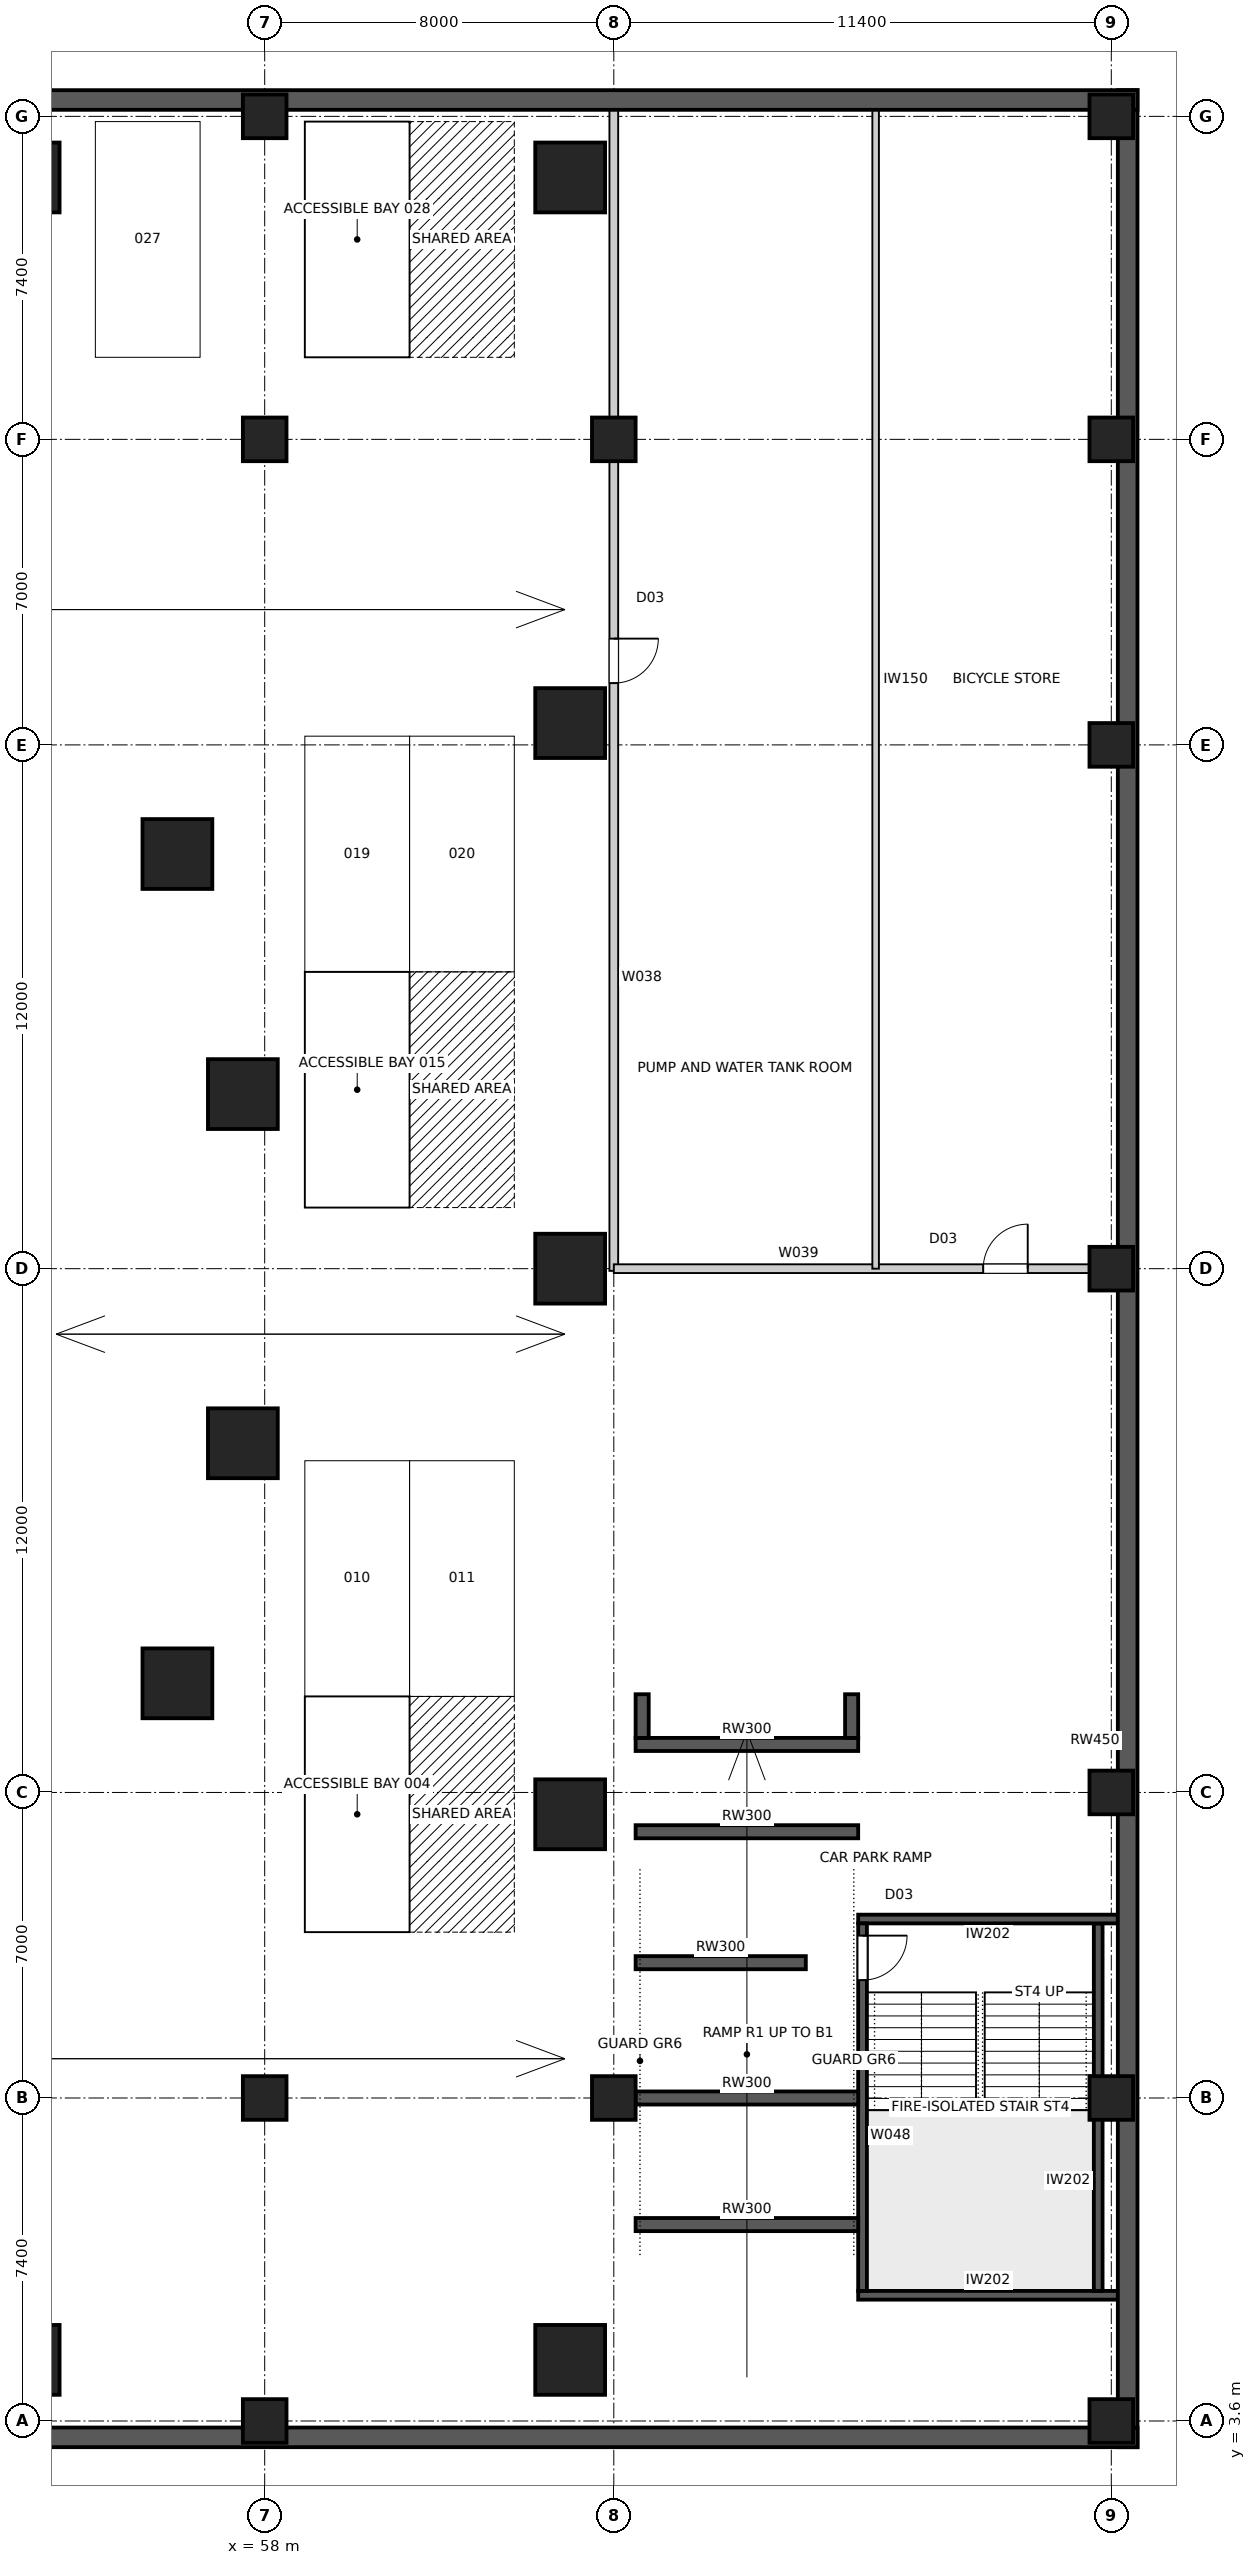
"""IFC4 building model, lengths in metres.
Left out: names, types, materials, properties, quantities, classifications, styles, units other than length and angle.
Written with IfcOpenShell. Run it as: python <this file> out.ifc"""

import sys

from ifc_helpers import new_model, si_unit, direction, frame, frame_2d, origin, origin_2d, place, context, subcontext, project, spatial, rectangle, extrude, element, fill, save


model = new_model("IFC4")
c1 = context("Model", 3, precision=1e-05, world=origin(), true_north=direction((0.0, 1.0)))
c2 = subcontext(c1, "Body", "Model", "MODEL_VIEW")
j1 = project(units=[si_unit("LENGTHUNIT", "METRE"), si_unit("PLANEANGLEUNIT", "RADIAN")], contexts=[c1])
p1 = place(None, origin())
s1 = spatial("IfcSite", under=j1, at=p1, CompositionType="ELEMENT")
p2 = place(p1, origin())
s2 = spatial("IfcBuilding", under=s1, at=p2, CompositionType="ELEMENT")
p3 = place(p2, frame((0.0, 0.0, -7.4)))
s3 = spatial("IfcBuildingStorey", under=s2, at=p3, CompositionType="ELEMENT", Elevation=-7.4)
for number, where, z_axis, x_axis in (
    (1, (52.5, 5.0, -0.4), (0.0, 0.0, 1.0), (1.0, 0.0, 0.0)),
    (2, (65.0, 5.0, -0.4), (0.0, 0.0, 1.0), (1.0, 0.0, 0.0)),
    (3, (65.0, 17.5, -0.4), (0.0, 0.0, 1.0), (1.0, 0.0, 0.0)),
    (4, (65.0, 30.0, -0.4), (0.0, 0.0, 1.0), (1.0, 0.0, 0.0)),
    (5, (65.0, 42.5, -0.4), (0.0, 0.0, 1.0), (1.0, 0.0, 0.0)),
    (6, (65.0, 55.0, -0.4), (0.0, 0.0, 1.0), (1.0, 0.0, 0.0)),
    (7, (52.5, 55.0, -0.4), (0.0, 0.0, 1.0), (1.0, 0.0, 0.0)),
):
    element("IfcColumn", number, at=place(p3, frame(where, z_axis=z_axis, x_axis=x_axis)), inside=s3, PredefinedType="COLUMN", context=c2, shape_type="SweptSolid", body=[
        extrude(rectangle(XDim=1.6, YDim=1.6, at=origin_2d()), origin(), (0.0, 0.0, 1.0), 4.1),
    ])
for number, where, z_axis, x_axis in (
    (8, (58.0, 3.6, -0.4), (0.0, 0.0, 1.0), (1.0, 0.0, 0.0)),
    (9, (58.0, 11.0, -0.4), (0.0, 0.0, 1.0), (1.0, 0.0, 0.0)),
    (10, (58.0, 49.0, -0.4), (0.0, 0.0, 1.0), (1.0, 0.0, 0.0)),
    (11, (58.0, 56.4, -0.4), (0.0, 0.0, 1.0), (1.0, 0.0, 0.0)),
    (12, (66.0, 11.0, -0.4), (0.0, 0.0, 1.0), (1.0, 0.0, 0.0)),
    (13, (66.0, 49.0, -0.4), (0.0, 0.0, 1.0), (1.0, 0.0, 0.0)),
    (14, (77.4, 3.6, -0.4), (0.0, 0.0, 1.0), (1.0, 0.0, 0.0)),
    (15, (77.4, 11.0, -0.4), (0.0, 0.0, 1.0), (1.0, 0.0, 0.0)),
    (16, (77.4, 18.0, -0.4), (0.0, 0.0, 1.0), (1.0, 0.0, 0.0)),
    (17, (77.4, 30.0, -0.4), (0.0, 0.0, 1.0), (1.0, 0.0, 0.0)),
    (18, (77.4, 42.0, -0.4), (0.0, 0.0, 1.0), (1.0, 0.0, 0.0)),
    (19, (77.4, 49.0, -0.4), (0.0, 0.0, 1.0), (1.0, 0.0, 0.0)),
    (20, (77.4, 56.4, -0.4), (0.0, 0.0, 1.0), (1.0, 0.0, 0.0)),
):
    element("IfcColumn", number, at=place(p3, frame(where, z_axis=z_axis, x_axis=x_axis)), inside=s3, PredefinedType="COLUMN", context=c2, shape_type="SweptSolid", body=[
        extrude(rectangle(XDim=1.0, YDim=1.0, at=origin_2d()), origin(), (0.0, 0.0, 1.0), 4.1),
    ])
for number, where, z_axis, x_axis in (
    (21, (57.5, 26.0, -0.4), (0.0, 0.0, 1.0), (1.0, 0.0, 0.0)),
    (22, (57.5, 34.0, -0.4), (0.0, 0.0, 1.0), (1.0, 0.0, 0.0)),
    (23, (56.0, 39.5, -0.4), (0.0, 0.0, 1.0), (1.0, 0.0, 0.0)),
    (24, (56.0, 20.5, -0.4), (0.0, 0.0, 1.0), (1.0, 0.0, 0.0)),
):
    element("IfcColumn", number, at=place(p3, frame(where, z_axis=z_axis, x_axis=x_axis)), inside=s3, PredefinedType="COLUMN", context=c2, shape_type="SweptSolid", body=[
        extrude(rectangle(XDim=1.6, YDim=1.6, at=origin_2d()), origin(), (0.0, 0.0, 1.0), 4.1),
    ])
p4 = place(p3, frame((2.0, 3.225, -0.4), z_axis=(0.0, 0.0, 1.0), x_axis=(1.0, 0.0, 0.0)))
e25 = element("IfcWall", 25, at=p4, inside=s3, PredefinedType="SHEAR", context=c2, shape_type="SweptSolid", body=[
    extrude(rectangle(XDim=76.0, YDim=0.45, at=frame_2d((38.0, 0.0))), origin(), (0.0, 0.0, 1.0), 4.1),
])
p5 = place(p3, frame((77.775, 3.0, -0.4), z_axis=(0.0, 0.0, 1.0), x_axis=(0.0, 1.0, 0.0)))
e26 = element("IfcWall", 26, at=p5, inside=s3, PredefinedType="SHEAR", context=c2, shape_type="SweptSolid", body=[
    extrude(rectangle(XDim=54.0, YDim=0.45, at=frame_2d((27.0, 0.0))), origin(), (0.0, 0.0, 1.0), 4.1),
])
p6 = place(p3, frame((78.0, 56.775, -0.4), z_axis=(0.0, 0.0, 1.0), x_axis=(-1.0, 0.0, 0.0)))
e27 = element("IfcWall", 27, at=p6, inside=s3, PredefinedType="SHEAR", context=c2, shape_type="SweptSolid", body=[
    extrude(rectangle(XDim=76.0, YDim=0.45, at=frame_2d((38.0, 0.0))), origin(), (0.0, 0.0, 1.0), 4.1),
])
p7 = place(p3, frame((71.6, 6.48, 0.0), z_axis=(0.0, 0.0, 1.0), x_axis=(1.0, 0.0, 0.0)))
e28 = element("IfcWall", 28, at=p7, inside=s3, PredefinedType="SOLIDWALL", context=c2, shape_type="SweptSolid", body=[
    extrude(rectangle(XDim=5.95, YDim=0.2, at=frame_2d((2.975, 0.0))), origin(), (0.0, 0.0, 1.0), 3.35),
])
p8 = place(p3, frame((77.1, 6.58, 0.0), z_axis=(0.0, 0.0, 1.0), x_axis=(0.0, 1.0, 0.0)))
e29 = element("IfcWall", 29, at=p8, inside=s3, PredefinedType="SOLIDWALL", context=c2, shape_type="SweptSolid", body=[
    extrude(rectangle(XDim=8.42, YDim=0.2, at=frame_2d((4.21, 0.0))), origin(), (0.0, 0.0, 1.0), 3.35),
])
p9 = place(p3, frame((77.55, 15.1, 0.0), z_axis=(0.0, 0.0, 1.0), x_axis=(-1.0, 0.0, 0.0)))
e30 = element("IfcWall", 30, at=p9, inside=s3, PredefinedType="SOLIDWALL", context=c2, shape_type="SweptSolid", body=[
    extrude(rectangle(XDim=5.95, YDim=0.2, at=frame_2d((2.975, 0.0))), origin(), (0.0, 0.0, 1.0), 3.35),
])
p10 = place(p3, frame((71.7, 15.0, 0.0), z_axis=(0.0, 0.0, 1.0), x_axis=(0.0, -1.0, 0.0)))
e31 = element("IfcWall", 31, at=p10, inside=s3, PredefinedType="SOLIDWALL", context=c2, shape_type="SweptSolid", body=[
    extrude(rectangle(XDim=8.42, YDim=0.2, at=frame_2d((4.21, 0.0))), origin(), (0.0, 0.0, 1.0), 3.35),
])
p11 = place(p10, frame((0.28, 0.0, 0.0)))
e32 = element("IfcOpeningElement", 32, at=p11, cuts=e31, PredefinedType="OPENING", context=c2, shape_type="SweptSolid", body=[
    extrude(rectangle(XDim=1.02, YDim=2.1, at=frame_2d((0.51, 1.05))), frame((0.0, 0.11, 0.0), z_axis=(0.0, -1.0, 0.0), x_axis=(1.0, 0.0, 0.0)), (0.0, 0.0, 1.0), 0.22),
])
p12 = place(p3, frame((66.0, 57.0, 0.0), z_axis=(0.0, 0.0, 1.0), x_axis=(0.0, -1.0, 0.0)))
e33 = element("IfcWall", 33, at=p12, inside=s3, PredefinedType="PARTITIONING", context=c2, shape_type="SweptSolid", body=[
    extrude(rectangle(XDim=27.05, YDim=0.2, at=frame_2d((13.525, 0.0))), origin(), (0.0, 0.0, 1.0), 3.35),
])
p13 = place(p12, frame((12.565, 0.0, 0.0)))
e34 = element("IfcOpeningElement", 34, at=p13, cuts=e33, PredefinedType="OPENING", context=c2, shape_type="SweptSolid", body=[
    extrude(rectangle(XDim=1.02, YDim=2.1, at=frame_2d((0.51, 1.05))), frame((0.0, 0.11, 0.0), z_axis=(0.0, -1.0, 0.0), x_axis=(1.0, 0.0, 0.0)), (0.0, 0.0, 1.0), 0.22),
])
p14 = place(p3, frame((66.0, 30.0, 0.0), z_axis=(0.0, 0.0, 1.0), x_axis=(1.0, 0.0, 0.0)))
e35 = element("IfcWall", 35, at=p14, inside=s3, PredefinedType="PARTITIONING", context=c2, shape_type="SweptSolid", body=[
    extrude(rectangle(XDim=12.0, YDim=0.2, at=frame_2d((6.0, 0.0))), origin(), (0.0, 0.0, 1.0), 3.35),
])
p15 = place(p14, frame((8.465, 0.0, 0.0)))
e36 = element("IfcOpeningElement", 36, at=p15, cuts=e35, PredefinedType="OPENING", context=c2, shape_type="SweptSolid", body=[
    extrude(rectangle(XDim=1.02, YDim=2.1, at=frame_2d((0.51, 1.05))), frame((0.0, 0.11, 0.0), z_axis=(0.0, -1.0, 0.0), x_axis=(1.0, 0.0, 0.0)), (0.0, 0.0, 1.0), 0.22),
])
p16 = place(p3, frame((72.0, 57.0, 0.0), z_axis=(0.0, 0.0, 1.0), x_axis=(0.0, -1.0, 0.0)))
e37 = element("IfcWall", 37, at=p16, inside=s3, PredefinedType="SOLIDWALL", context=c2, shape_type="SweptSolid", body=[
    extrude(rectangle(XDim=27.0, YDim=0.15, at=frame_2d((13.5, 0.0))), origin(), (0.0, 0.0, 1.0), 3.35),
])
p17 = place(p3, frame((66.5, 8.1, 0.0), z_axis=(0.0, 0.0, 1.0), x_axis=(1.0, 0.0, 0.0)))
e38 = element("IfcWall", 38, at=p17, inside=s3, PredefinedType="SHEAR", context=c2, shape_type="SweptSolid", body=[
    extrude(rectangle(XDim=5.1, YDim=0.3, at=frame_2d((2.55, 0.0))), origin(), (0.0, 0.0, 1.0), 0.59),
])
p18 = place(p3, frame((66.5, 11.0, 0.0), z_axis=(0.0, 0.0, 1.0), x_axis=(1.0, 0.0, 0.0)))
e39 = element("IfcWall", 39, at=p18, inside=s3, PredefinedType="SHEAR", context=c2, shape_type="SweptSolid", body=[
    extrude(rectangle(XDim=5.1, YDim=0.3, at=frame_2d((2.55, 0.0))), origin(), (0.0, 0.0, 1.0), 1.315),
])
p19 = place(p3, frame((66.5, 14.1, 0.0), z_axis=(0.0, 0.0, 1.0), x_axis=(1.0, 0.0, 0.0)))
e40 = element("IfcWall", 40, at=p19, inside=s3, PredefinedType="SHEAR", context=c2, shape_type="SweptSolid", body=[
    extrude(rectangle(XDim=3.9, YDim=0.3, at=frame_2d((1.95, 0.0))), origin(), (0.0, 0.0, 1.0), 2.09),
])
p20 = place(p3, frame((66.5, 17.1, 0.0), z_axis=(0.0, 0.0, 1.0), x_axis=(1.0, 0.0, 0.0)))
e41 = element("IfcWall", 41, at=p20, inside=s3, PredefinedType="SHEAR", context=c2, shape_type="SweptSolid", body=[
    extrude(rectangle(XDim=5.1, YDim=0.3, at=frame_2d((2.55, 0.0))), origin(), (0.0, 0.0, 1.0), 2.84),
])
p21 = place(p3, frame((66.5, 19.1, 0.0), z_axis=(0.0, 0.0, 1.0), x_axis=(1.0, 0.0, 0.0)))
e42 = element("IfcWall", 42, at=p21, inside=s3, PredefinedType="SHEAR", context=c2, shape_type="SweptSolid", body=[
    extrude(rectangle(XDim=5.1, YDim=0.3, at=frame_2d((2.55, 0.0))), origin(), (0.0, 0.0, 1.0), 3.277),
])
for number, where, z_axis, x_axis in (
    (43, (66.65, 19.25, 0.0), (0.0, 0.0, 1.0), (0.0, 1.0, 0.0)),
    (44, (71.45, 19.25, 0.0), (0.0, 0.0, 1.0), (0.0, 1.0, 0.0)),
):
    element("IfcWall", number, at=place(p3, frame(where, z_axis=z_axis, x_axis=x_axis)), inside=s3, PredefinedType="SHEAR", context=c2, shape_type="SweptSolid", body=[
        extrude(rectangle(XDim=1.0, YDim=0.3, at=frame_2d((0.5, 0.0))), origin(), (0.0, 0.0, 1.0), 3.314),
    ])
p22 = place(p2, frame((0.0, 0.0, -3.7)))
s4 = spatial("IfcBuildingStorey", under=s2, at=p22, CompositionType="ELEMENT", Elevation=-3.7)
p23 = place(p22, frame((66.5, 51.9, -3.7), z_axis=(0.0, 0.0, 1.0), x_axis=(1.0, 0.0, 0.0)))
e45 = element("IfcWall", 45, at=p23, inside=s4, PredefinedType="SHEAR", context=c2, shape_type="SweptSolid", body=[
    extrude(rectangle(XDim=5.1, YDim=0.3, at=frame_2d((2.55, 0.0))), origin(), (0.0, 0.0, 1.0), 6.977),
])
for number, where, z_axis, x_axis in (
    (46, (66.65, 52.05, -3.7), (0.0, 0.0, 1.0), (0.0, 1.0, 0.0)),
    (47, (71.45, 52.05, -3.7), (0.0, 0.0, 1.0), (0.0, 1.0, 0.0)),
):
    element("IfcWall", number, at=place(p22, frame(where, z_axis=z_axis, x_axis=x_axis)), inside=s4, PredefinedType="SHEAR", context=c2, shape_type="SweptSolid", body=[
        extrude(rectangle(XDim=1.0, YDim=0.3, at=frame_2d((0.5, 0.0))), origin(), (0.0, 0.0, 1.0), 7.014),
    ])
p24 = place(p13, origin())
e48 = element("IfcDoor", 48, at=p24, inside=s3, OperationType="SINGLE_SWING_LEFT", PredefinedType="DOOR", context=c2, shape_type="SweptSolid", body=[
    extrude(rectangle(XDim=1.02, YDim=2.1, at=frame_2d((0.51, 1.05))), frame((0.0, 0.025, 0.0), z_axis=(0.0, -1.0, 0.0), x_axis=(1.0, 0.0, 0.0)), (0.0, 0.0, 1.0), 0.05),
])
fill(e34, e48)
p25 = place(p11, origin())
e49 = element("IfcDoor", 49, at=p25, inside=s3, OperationType="SINGLE_SWING_LEFT", PredefinedType="DOOR", context=c2, shape_type="SweptSolid", body=[
    extrude(rectangle(XDim=1.02, YDim=2.1, at=frame_2d((0.51, 1.05))), frame((0.0, 0.025, 0.0), z_axis=(0.0, -1.0, 0.0), x_axis=(1.0, 0.0, 0.0)), (0.0, 0.0, 1.0), 0.05),
])
fill(e32, e49)
p26 = place(p15, origin())
e50 = element("IfcDoor", 50, at=p26, inside=s3, OperationType="SINGLE_SWING_RIGHT", PredefinedType="DOOR", context=c2, shape_type="SweptSolid", body=[
    extrude(rectangle(XDim=1.02, YDim=2.1, at=frame_2d((0.51, 1.05))), frame((0.0, 0.025, 0.0), z_axis=(0.0, -1.0, 0.0), x_axis=(1.0, 0.0, 0.0)), (0.0, 0.0, 1.0), 0.05),
])
fill(e36, e50)
save(model, sys.argv[1])
